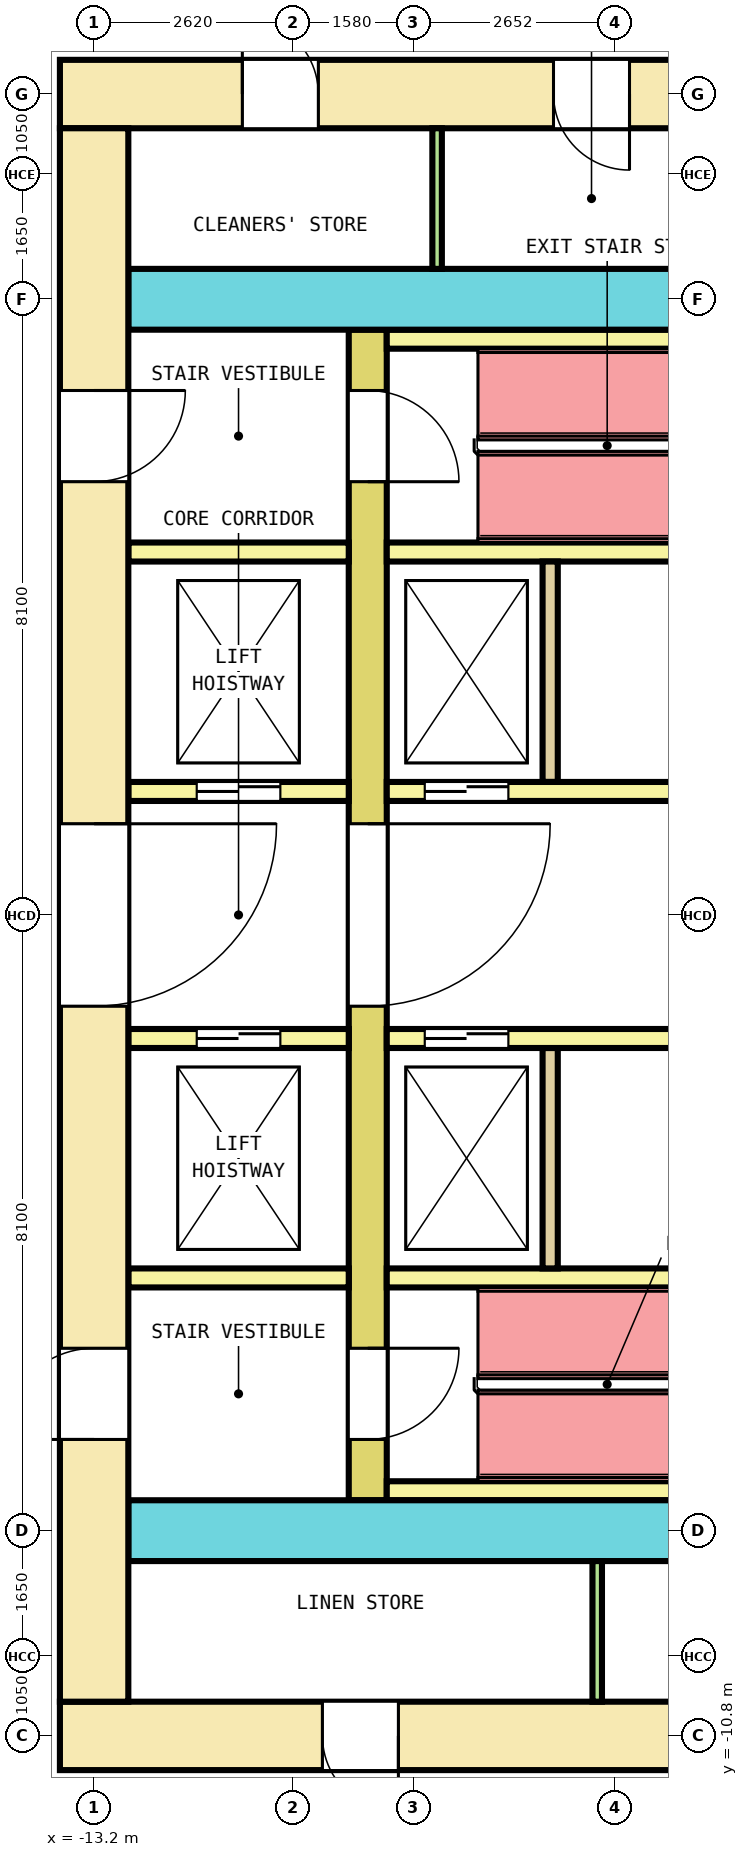
"""IFC4 building model, lengths in metres.
Left out: names, types, materials, properties, quantities, classifications, styles, units other than length and angle.
Written with IfcOpenShell. Run it as: python <this file> out.ifc"""

import sys

from ifc_helpers import new_model, si_unit, direction, frame, frame_2d, origin, place, context, subcontext, project, spatial, rectangle, extrude, element, fill, save


model = new_model("IFC4")
c1 = context("Model", 3, precision=1e-05, world=origin(), true_north=direction((0.0, 1.0)))
c2 = subcontext(c1, "Body", "Model", "MODEL_VIEW")
j1 = project(units=[si_unit("LENGTHUNIT", "METRE"), si_unit("PLANEANGLEUNIT", "RADIAN")], contexts=[c1])
p1 = place(None, origin())
s1 = spatial("IfcSite", under=j1, at=p1, CompositionType="ELEMENT")
p2 = place(p1, origin())
s2 = spatial("IfcBuilding", under=s1, at=p2, CompositionType="ELEMENT")
p3 = place(p2, frame((0.0, 0.0, 32.2)))
s3 = spatial("IfcBuildingStorey", under=s2, at=p3, CompositionType="ELEMENT", Elevation=32.2)
p4 = place(p3, frame((-13.65, 10.8, 0.0), z_axis=(0.0, 0.0, 1.0), x_axis=(1.0, 0.0, 0.0)))
e1 = element("IfcWall", 1, at=p4, inside=s3, PredefinedType="SHEAR", context=c2, shape_type="SweptSolid", body=[
    extrude(rectangle(XDim=27.3, YDim=0.9, at=frame_2d((13.65, 0.0))), origin(), (0.0, 0.0, 1.0), 4.1),
])
p5 = place(p4, frame((2.4, 0.0, 0.0)))
e2 = element("IfcOpeningElement", 2, at=p5, cuts=e1, PredefinedType="OPENING", context=c2, shape_type="SweptSolid", body=[
    extrude(rectangle(XDim=1.0, YDim=2.1, at=frame_2d((0.5, 1.05))), frame((0.0, 0.46, 0.0), z_axis=(0.0, -1.0, 0.0), x_axis=(1.0, 0.0, 0.0)), (0.0, 0.0, 1.0), 0.92),
])
p6 = place(p4, frame((6.494, 0.0, 0.0)))
e3 = element("IfcOpeningElement", 3, at=p6, cuts=e1, PredefinedType="OPENING", context=c2, shape_type="SweptSolid", body=[
    extrude(rectangle(XDim=1.0, YDim=2.1, at=frame_2d((0.5, 1.05))), frame((0.0, 0.46, 0.0), z_axis=(0.0, -1.0, 0.0), x_axis=(1.0, 0.0, 0.0)), (0.0, 0.0, 1.0), 0.92),
])
p7 = place(p4, frame((10.556, 0.0, 0.0)))
e4 = element("IfcOpeningElement", 4, at=p7, cuts=e1, PredefinedType="OPENING", context=c2, shape_type="SweptSolid", body=[
    extrude(rectangle(XDim=1.0, YDim=2.1, at=frame_2d((0.5, 1.05))), frame((0.0, 0.46, 0.0), z_axis=(0.0, -1.0, 0.0), x_axis=(1.0, 0.0, 0.0)), (0.0, 0.0, 1.0), 0.92),
])
p8 = place(p4, frame((18.859, 0.0, 0.0)))
e5 = element("IfcOpeningElement", 5, at=p8, cuts=e1, PredefinedType="OPENING", context=c2, shape_type="SweptSolid", body=[
    extrude(rectangle(XDim=1.0, YDim=2.1, at=frame_2d((0.5, 1.05))), frame((0.0, 0.46, 0.0), z_axis=(0.0, -1.0, 0.0), x_axis=(1.0, 0.0, 0.0)), (0.0, 0.0, 1.0), 0.92),
])
p9 = place(p4, frame((23.584, 0.0, 0.0)))
e6 = element("IfcOpeningElement", 6, at=p9, cuts=e1, PredefinedType="OPENING", context=c2, shape_type="SweptSolid", body=[
    extrude(rectangle(XDim=1.0, YDim=2.1, at=frame_2d((0.5, 1.05))), frame((0.0, 0.46, 0.0), z_axis=(0.0, -1.0, 0.0), x_axis=(1.0, 0.0, 0.0)), (0.0, 0.0, 1.0), 0.92),
])
p10 = place(p4, frame((14.575, 0.0, 0.0)))
e7 = element("IfcOpeningElement", 7, at=p10, cuts=e1, PredefinedType="OPENING", context=c2, shape_type="SweptSolid", body=[
    extrude(rectangle(XDim=1.4, YDim=2.1, at=frame_2d((0.7, 1.05))), frame((0.0, 0.46, 0.0), z_axis=(0.0, -1.0, 0.0), x_axis=(1.0, 0.0, 0.0)), (0.0, 0.0, 1.0), 0.92),
])
p11 = place(p3, frame((-13.65, -10.8, 0.0), z_axis=(0.0, 0.0, 1.0), x_axis=(1.0, 0.0, 0.0)))
e8 = element("IfcWall", 8, at=p11, inside=s3, PredefinedType="SHEAR", context=c2, shape_type="SweptSolid", body=[
    extrude(rectangle(XDim=27.3, YDim=0.9, at=frame_2d((13.65, 0.0))), origin(), (0.0, 0.0, 1.0), 4.1),
])
p12 = place(p11, frame((3.453, 0.0, 0.0)))
e9 = element("IfcOpeningElement", 9, at=p12, cuts=e8, PredefinedType="OPENING", context=c2, shape_type="SweptSolid", body=[
    extrude(rectangle(XDim=1.0, YDim=2.1, at=frame_2d((0.5, 1.05))), frame((0.0, 0.46, 0.0), z_axis=(0.0, -1.0, 0.0), x_axis=(1.0, 0.0, 0.0)), (0.0, 0.0, 1.0), 0.92),
])
p13 = place(p11, frame((9.653, 0.0, 0.0)))
e10 = element("IfcOpeningElement", 10, at=p13, cuts=e8, PredefinedType="OPENING", context=c2, shape_type="SweptSolid", body=[
    extrude(rectangle(XDim=1.0, YDim=2.1, at=frame_2d((0.5, 1.05))), frame((0.0, 0.46, 0.0), z_axis=(0.0, -1.0, 0.0), x_axis=(1.0, 0.0, 0.0)), (0.0, 0.0, 1.0), 0.92),
])
p14 = place(p11, frame((19.872, 0.0, 0.0)))
e11 = element("IfcOpeningElement", 11, at=p14, cuts=e8, PredefinedType="OPENING", context=c2, shape_type="SweptSolid", body=[
    extrude(rectangle(XDim=1.0, YDim=2.1, at=frame_2d((0.5, 1.05))), frame((0.0, 0.46, 0.0), z_axis=(0.0, -1.0, 0.0), x_axis=(1.0, 0.0, 0.0)), (0.0, 0.0, 1.0), 0.92),
])
p15 = place(p11, frame((23.922, 0.0, 0.0)))
e12 = element("IfcOpeningElement", 12, at=p15, cuts=e8, PredefinedType="OPENING", context=c2, shape_type="SweptSolid", body=[
    extrude(rectangle(XDim=1.0, YDim=2.1, at=frame_2d((0.5, 1.05))), frame((0.0, 0.46, 0.0), z_axis=(0.0, -1.0, 0.0), x_axis=(1.0, 0.0, 0.0)), (0.0, 0.0, 1.0), 0.92),
])
p16 = place(p11, frame((15.2, 0.0, 0.0)))
e13 = element("IfcOpeningElement", 13, at=p16, cuts=e8, PredefinedType="OPENING", context=c2, shape_type="SweptSolid", body=[
    extrude(rectangle(XDim=1.2, YDim=2.1, at=frame_2d((0.6, 1.05))), frame((0.0, 0.46, 0.0), z_axis=(0.0, -1.0, 0.0), x_axis=(1.0, 0.0, 0.0)), (0.0, 0.0, 1.0), 0.92),
])
p17 = place(p3, frame((-13.2, -10.35, 0.0), z_axis=(0.0, 0.0, 1.0), x_axis=(0.0, 1.0, 0.0)))
e14 = element("IfcWall", 14, at=p17, inside=s3, PredefinedType="SHEAR", context=c2, shape_type="SweptSolid", body=[
    extrude(rectangle(XDim=20.7, YDim=0.9, at=frame_2d((10.35, 0.0))), origin(), (0.0, 0.0, 1.0), 4.1),
])
p18 = place(p17, frame((9.15, 0.0, 0.0)))
e15 = element("IfcOpeningElement", 15, at=p18, cuts=e14, PredefinedType="OPENING", context=c2, shape_type="SweptSolid", body=[
    extrude(rectangle(XDim=2.4, YDim=2.1, at=frame_2d((1.2, 1.05))), frame((0.0, 0.46, 0.0), z_axis=(0.0, -1.0, 0.0), x_axis=(1.0, 0.0, 0.0)), (0.0, 0.0, 1.0), 0.92),
])
p19 = place(p17, frame((16.05, 0.0, 0.0)))
e16 = element("IfcOpeningElement", 16, at=p19, cuts=e14, PredefinedType="OPENING", context=c2, shape_type="SweptSolid", body=[
    extrude(rectangle(XDim=1.2, YDim=2.1, at=frame_2d((0.6, 1.05))), frame((0.0, 0.46, 0.0), z_axis=(0.0, -1.0, 0.0), x_axis=(1.0, 0.0, 0.0)), (0.0, 0.0, 1.0), 0.92),
])
p20 = place(p17, frame((3.45, 0.0, 0.0)))
e17 = element("IfcOpeningElement", 17, at=p20, cuts=e14, PredefinedType="OPENING", context=c2, shape_type="SweptSolid", body=[
    extrude(rectangle(XDim=1.2, YDim=2.1, at=frame_2d((0.6, 1.05))), frame((0.0, 0.46, 0.0), z_axis=(0.0, -1.0, 0.0), x_axis=(1.0, 0.0, 0.0)), (0.0, 0.0, 1.0), 0.92),
])
p21 = place(p3, frame((-12.75, 8.1, 0.0), z_axis=(0.0, 0.0, 1.0), x_axis=(1.0, 0.0, 0.0)))
e18 = element("IfcWall", 18, at=p21, inside=s3, PredefinedType="SHEAR", context=c2, shape_type="SweptSolid", body=[
    extrude(rectangle(XDim=25.5, YDim=0.8, at=frame_2d((12.75, 0.0))), origin(), (0.0, 0.0, 1.0), 4.1),
])
p22 = place(p21, frame((13.675, 0.0, 0.0)))
e19 = element("IfcOpeningElement", 19, at=p22, cuts=e18, PredefinedType="OPENING", context=c2, shape_type="SweptSolid", body=[
    extrude(rectangle(XDim=1.4, YDim=2.1, at=frame_2d((0.7, 1.05))), frame((0.0, 0.41, 0.0), z_axis=(0.0, -1.0, 0.0), x_axis=(1.0, 0.0, 0.0)), (0.0, 0.0, 1.0), 0.82),
])
p23 = place(p3, frame((-12.75, -8.1, 0.0), z_axis=(0.0, 0.0, 1.0), x_axis=(1.0, 0.0, 0.0)))
e20 = element("IfcWall", 20, at=p23, inside=s3, PredefinedType="SHEAR", context=c2, shape_type="SweptSolid", body=[
    extrude(rectangle(XDim=25.5, YDim=0.8, at=frame_2d((12.75, 0.0))), origin(), (0.0, 0.0, 1.0), 4.1),
])
p24 = place(p23, frame((14.3, 0.0, 0.0)))
e21 = element("IfcOpeningElement", 21, at=p24, cuts=e20, PredefinedType="OPENING", context=c2, shape_type="SweptSolid", body=[
    extrude(rectangle(XDim=1.2, YDim=2.1, at=frame_2d((0.6, 1.05))), frame((0.0, 0.41, 0.0), z_axis=(0.0, -1.0, 0.0), x_axis=(1.0, 0.0, 0.0)), (0.0, 0.0, 1.0), 0.82),
])
p25 = place(p3, frame((-9.6, -7.7, 0.0), z_axis=(0.0, 0.0, 1.0), x_axis=(0.0, 1.0, 0.0)))
e22 = element("IfcWall", 22, at=p25, inside=s3, PredefinedType="SHEAR", context=c2, shape_type="SweptSolid", body=[
    extrude(rectangle(XDim=15.4, YDim=0.5, at=frame_2d((7.7, 0.0))), origin(), (0.0, 0.0, 1.0), 4.1),
])
p26 = place(p25, frame((6.5, 0.0, 0.0)))
e23 = element("IfcOpeningElement", 23, at=p26, cuts=e22, PredefinedType="OPENING", context=c2, shape_type="SweptSolid", body=[
    extrude(rectangle(XDim=2.4, YDim=2.1, at=frame_2d((1.2, 1.05))), frame((0.0, 0.26, 0.0), z_axis=(0.0, -1.0, 0.0), x_axis=(1.0, 0.0, 0.0)), (0.0, 0.0, 1.0), 0.52),
])
p27 = place(p25, frame((13.4, 0.0, 0.0)))
e24 = element("IfcOpeningElement", 24, at=p27, cuts=e22, PredefinedType="OPENING", context=c2, shape_type="SweptSolid", body=[
    extrude(rectangle(XDim=1.2, YDim=2.1, at=frame_2d((0.6, 1.05))), frame((0.0, 0.26, 0.0), z_axis=(0.0, -1.0, 0.0), x_axis=(1.0, 0.0, 0.0)), (0.0, 0.0, 1.0), 0.52),
])
p28 = place(p25, frame((0.8, 0.0, 0.0)))
e25 = element("IfcOpeningElement", 25, at=p28, cuts=e22, PredefinedType="OPENING", context=c2, shape_type="SweptSolid", body=[
    extrude(rectangle(XDim=1.2, YDim=2.1, at=frame_2d((0.6, 1.05))), frame((0.0, 0.26, 0.0), z_axis=(0.0, -1.0, 0.0), x_axis=(1.0, 0.0, 0.0)), (0.0, 0.0, 1.0), 0.52),
])
p29 = place(p3, frame((-12.75, 1.625, 0.0), z_axis=(0.0, 0.0, 1.0), x_axis=(1.0, 0.0, 0.0)))
e26 = element("IfcWall", 26, at=p29, inside=s3, PredefinedType="SOLIDWALL", context=c2, shape_type="SweptSolid", body=[
    extrude(rectangle(XDim=2.9, YDim=0.25, at=frame_2d((1.45, 0.0))), origin(), (0.0, 0.0, 1.0), 4.1),
])
p30 = place(p29, frame((0.9, 0.0, 0.0)))
e27 = element("IfcOpeningElement", 27, at=p30, cuts=e26, PredefinedType="OPENING", context=c2, shape_type="SweptSolid", body=[
    extrude(rectangle(XDim=1.1, YDim=2.1, at=frame_2d((0.55, 1.05))), frame((0.0, 0.135, 0.0), z_axis=(0.0, -1.0, 0.0), x_axis=(1.0, 0.0, 0.0)), (0.0, 0.0, 1.0), 0.27),
])
p31 = place(p3, frame((-9.35, 1.625, 0.0), z_axis=(0.0, 0.0, 1.0), x_axis=(1.0, 0.0, 0.0)))
e28 = element("IfcWall", 28, at=p31, inside=s3, PredefinedType="SOLIDWALL", context=c2, shape_type="SweptSolid", body=[
    extrude(rectangle(XDim=18.7, YDim=0.25, at=frame_2d((9.35, 0.0))), origin(), (0.0, 0.0, 1.0), 4.1),
])
p32 = place(p31, frame((0.5, 0.0, 0.0)))
e29 = element("IfcOpeningElement", 29, at=p32, cuts=e28, PredefinedType="OPENING", context=c2, shape_type="SweptSolid", body=[
    extrude(rectangle(XDim=1.1, YDim=2.1, at=frame_2d((0.55, 1.05))), frame((0.0, 0.135, 0.0), z_axis=(0.0, -1.0, 0.0), x_axis=(1.0, 0.0, 0.0)), (0.0, 0.0, 1.0), 0.27),
])
p33 = place(p31, frame((17.1, 0.0, 0.0)))
e30 = element("IfcOpeningElement", 30, at=p33, cuts=e28, PredefinedType="OPENING", context=c2, shape_type="SweptSolid", body=[
    extrude(rectangle(XDim=1.1, YDim=2.1, at=frame_2d((0.55, 1.05))), frame((0.0, 0.135, 0.0), z_axis=(0.0, -1.0, 0.0), x_axis=(1.0, 0.0, 0.0)), (0.0, 0.0, 1.0), 0.27),
])
p34 = place(p3, frame((-12.75, 4.775, 0.0), z_axis=(0.0, 0.0, 1.0), x_axis=(1.0, 0.0, 0.0)))
e31 = element("IfcWall", 31, at=p34, inside=s3, PredefinedType="SOLIDWALL", context=c2, shape_type="SweptSolid", body=[
    extrude(rectangle(XDim=2.9, YDim=0.25, at=frame_2d((1.45, 0.0))), origin(), (0.0, 0.0, 1.0), 4.1),
])
p35 = place(p3, frame((-9.35, 4.775, 0.0), z_axis=(0.0, 0.0, 1.0), x_axis=(1.0, 0.0, 0.0)))
e32 = element("IfcWall", 32, at=p35, inside=s3, PredefinedType="SOLIDWALL", context=c2, shape_type="SweptSolid", body=[
    extrude(rectangle(XDim=18.7, YDim=0.25, at=frame_2d((9.35, 0.0))), origin(), (0.0, 0.0, 1.0), 4.1),
])
p36 = place(p3, frame((-7.2, 1.75, 0.0), z_axis=(0.0, 0.0, 1.0), x_axis=(0.0, 1.0, 0.0)))
e33 = element("IfcWall", 33, at=p36, inside=s3, PredefinedType="SOLIDWALL", context=c2, shape_type="SweptSolid", body=[
    extrude(rectangle(XDim=2.9, YDim=0.2, at=frame_2d((1.45, 0.0))), origin(), (0.0, 0.0, 1.0), 4.1),
])
p37 = place(p3, frame((-12.75, -1.625, 0.0), z_axis=(0.0, 0.0, 1.0), x_axis=(1.0, 0.0, 0.0)))
e34 = element("IfcWall", 34, at=p37, inside=s3, PredefinedType="SOLIDWALL", context=c2, shape_type="SweptSolid", body=[
    extrude(rectangle(XDim=2.9, YDim=0.25, at=frame_2d((1.45, 0.0))), origin(), (0.0, 0.0, 1.0), 4.1),
])
p38 = place(p37, frame((0.9, 0.0, 0.0)))
e35 = element("IfcOpeningElement", 35, at=p38, cuts=e34, PredefinedType="OPENING", context=c2, shape_type="SweptSolid", body=[
    extrude(rectangle(XDim=1.1, YDim=2.1, at=frame_2d((0.55, 1.05))), frame((0.0, 0.135, 0.0), z_axis=(0.0, -1.0, 0.0), x_axis=(1.0, 0.0, 0.0)), (0.0, 0.0, 1.0), 0.27),
])
p39 = place(p3, frame((-9.35, -1.625, 0.0), z_axis=(0.0, 0.0, 1.0), x_axis=(1.0, 0.0, 0.0)))
e36 = element("IfcWall", 36, at=p39, inside=s3, PredefinedType="SOLIDWALL", context=c2, shape_type="SweptSolid", body=[
    extrude(rectangle(XDim=18.7, YDim=0.25, at=frame_2d((9.35, 0.0))), origin(), (0.0, 0.0, 1.0), 4.1),
])
p40 = place(p39, frame((0.5, 0.0, 0.0)))
e37 = element("IfcOpeningElement", 37, at=p40, cuts=e36, PredefinedType="OPENING", context=c2, shape_type="SweptSolid", body=[
    extrude(rectangle(XDim=1.1, YDim=2.1, at=frame_2d((0.55, 1.05))), frame((0.0, 0.135, 0.0), z_axis=(0.0, -1.0, 0.0), x_axis=(1.0, 0.0, 0.0)), (0.0, 0.0, 1.0), 0.27),
])
p41 = place(p39, frame((17.1, 0.0, 0.0)))
e38 = element("IfcOpeningElement", 38, at=p41, cuts=e36, PredefinedType="OPENING", context=c2, shape_type="SweptSolid", body=[
    extrude(rectangle(XDim=1.1, YDim=2.1, at=frame_2d((0.55, 1.05))), frame((0.0, 0.135, 0.0), z_axis=(0.0, -1.0, 0.0), x_axis=(1.0, 0.0, 0.0)), (0.0, 0.0, 1.0), 0.27),
])
p42 = place(p3, frame((-12.75, -4.775, 0.0), z_axis=(0.0, 0.0, 1.0), x_axis=(1.0, 0.0, 0.0)))
e39 = element("IfcWall", 39, at=p42, inside=s3, PredefinedType="SOLIDWALL", context=c2, shape_type="SweptSolid", body=[
    extrude(rectangle(XDim=2.9, YDim=0.25, at=frame_2d((1.45, 0.0))), origin(), (0.0, 0.0, 1.0), 4.1),
])
p43 = place(p3, frame((-9.35, -4.775, 0.0), z_axis=(0.0, 0.0, 1.0), x_axis=(1.0, 0.0, 0.0)))
e40 = element("IfcWall", 40, at=p43, inside=s3, PredefinedType="SOLIDWALL", context=c2, shape_type="SweptSolid", body=[
    extrude(rectangle(XDim=18.7, YDim=0.25, at=frame_2d((9.35, 0.0))), origin(), (0.0, 0.0, 1.0), 4.1),
])
p44 = place(p3, frame((-7.2, -4.65, 0.0), z_axis=(0.0, 0.0, 1.0), x_axis=(0.0, 1.0, 0.0)))
e41 = element("IfcWall", 41, at=p44, inside=s3, PredefinedType="SOLIDWALL", context=c2, shape_type="SweptSolid", body=[
    extrude(rectangle(XDim=2.9, YDim=0.2, at=frame_2d((1.45, 0.0))), origin(), (0.0, 0.0, 1.0), 4.1),
])
for number, where, z_axis, x_axis in (
    (42, (-9.35, 7.575, 0.0), (0.0, 0.0, 1.0), (1.0, 0.0, 0.0)),
    (43, (-9.35, -7.575, 0.0), (0.0, 0.0, 1.0), (1.0, 0.0, 0.0)),
):
    element("IfcWall", number, at=place(p3, frame(where, z_axis=z_axis, x_axis=x_axis)), inside=s3, PredefinedType="SOLIDWALL", context=c2, shape_type="SweptSolid", body=[
        extrude(rectangle(XDim=5.8, YDim=0.25, at=frame_2d((2.9, 0.0))), origin(), (0.0, 0.0, 1.0), 4.1),
    ])
for number, where, z_axis, x_axis in (
    (44, (-8.688, 8.5, 0.0), (0.0, 0.0, 1.0), (0.0, 1.0, 0.0)),
    (45, (-6.581, -10.35, 0.0), (0.0, 0.0, 1.0), (0.0, 1.0, 0.0)),
):
    element("IfcWall", number, at=place(p3, frame(where, z_axis=z_axis, x_axis=x_axis)), inside=s3, PredefinedType="PARTITIONING", context=c2, shape_type="SweptSolid", body=[
        extrude(rectangle(XDim=1.85, YDim=0.125, at=frame_2d((0.925, 0.0))), origin(), (0.0, 0.0, 1.0), 4.1),
    ])
p45 = place(p30, origin())
e46 = element("IfcDoor", 46, at=p45, inside=s3, OperationType="DOUBLE_DOOR_SLIDING", PredefinedType="DOOR", context=c2, shape_type="SweptSolid", body=[
    extrude(rectangle(XDim=1.1, YDim=2.1, at=frame_2d((0.55, 1.05))), frame((0.0, 0.075, 0.0), z_axis=(0.0, -1.0, 0.0), x_axis=(1.0, 0.0, 0.0)), (0.0, 0.0, 1.0), 0.15),
])
fill(e27, e46)
p46 = place(p32, origin())
e47 = element("IfcDoor", 47, at=p46, inside=s3, OperationType="DOUBLE_DOOR_SLIDING", PredefinedType="DOOR", context=c2, shape_type="SweptSolid", body=[
    extrude(rectangle(XDim=1.1, YDim=2.1, at=frame_2d((0.55, 1.05))), frame((0.0, 0.075, 0.0), z_axis=(0.0, -1.0, 0.0), x_axis=(1.0, 0.0, 0.0)), (0.0, 0.0, 1.0), 0.15),
])
fill(e29, e47)
p47 = place(p38, origin())
e48 = element("IfcDoor", 48, at=p47, inside=s3, OperationType="DOUBLE_DOOR_SLIDING", PredefinedType="DOOR", context=c2, shape_type="SweptSolid", body=[
    extrude(rectangle(XDim=1.1, YDim=2.1, at=frame_2d((0.55, 1.05))), frame((0.0, 0.075, 0.0), z_axis=(0.0, -1.0, 0.0), x_axis=(1.0, 0.0, 0.0)), (0.0, 0.0, 1.0), 0.15),
])
fill(e35, e48)
p48 = place(p40, origin())
e49 = element("IfcDoor", 49, at=p48, inside=s3, OperationType="DOUBLE_DOOR_SLIDING", PredefinedType="DOOR", context=c2, shape_type="SweptSolid", body=[
    extrude(rectangle(XDim=1.1, YDim=2.1, at=frame_2d((0.55, 1.05))), frame((0.0, 0.075, 0.0), z_axis=(0.0, -1.0, 0.0), x_axis=(1.0, 0.0, 0.0)), (0.0, 0.0, 1.0), 0.15),
])
fill(e37, e49)
p49 = place(p26, origin())
e50 = element("IfcDoor", 50, at=p49, inside=s3, OperationType="DOUBLE_DOOR_SINGLE_SWING", PredefinedType="DOOR", context=c2, shape_type="SweptSolid", body=[
    extrude(rectangle(XDim=2.4, YDim=2.1, at=frame_2d((1.2, 1.05))), frame((0.0, 0.2, 0.0), z_axis=(0.0, -1.0, 0.0), x_axis=(1.0, 0.0, 0.0)), (0.0, 0.0, 1.0), 0.4),
])
fill(e23, e50)
p50 = place(p18, origin())
e51 = element("IfcDoor", 51, at=p50, inside=s3, OperationType="DOUBLE_DOOR_SINGLE_SWING", PredefinedType="DOOR", context=c2, shape_type="SweptSolid", body=[
    extrude(rectangle(XDim=2.4, YDim=2.1, at=frame_2d((1.2, 1.05))), frame((0.0, 0.3, 0.0), z_axis=(0.0, -1.0, 0.0), x_axis=(1.0, 0.0, 0.0)), (0.0, 0.0, 1.0), 0.6),
])
fill(e15, e51)
p51 = place(p27, origin())
e52 = element("IfcDoor", 52, at=p51, inside=s3, OperationType="SINGLE_SWING_RIGHT", PredefinedType="DOOR", context=c2, shape_type="SweptSolid", body=[
    extrude(rectangle(XDim=1.2, YDim=2.1, at=frame_2d((0.6, 1.05))), frame((0.0, 0.2, 0.0), z_axis=(0.0, -1.0, 0.0), x_axis=(1.0, 0.0, 0.0)), (0.0, 0.0, 1.0), 0.4),
])
fill(e24, e52)
p52 = place(p19, origin())
e53 = element("IfcDoor", 53, at=p52, inside=s3, OperationType="SINGLE_SWING_LEFT", PredefinedType="DOOR", context=c2, shape_type="SweptSolid", body=[
    extrude(rectangle(XDim=1.2, YDim=2.1, at=frame_2d((0.6, 1.05))), frame((0.0, 0.3, 0.0), z_axis=(0.0, -1.0, 0.0), x_axis=(1.0, 0.0, 0.0)), (0.0, 0.0, 1.0), 0.6),
])
fill(e16, e53)
p53 = place(p28, origin())
e54 = element("IfcDoor", 54, at=p53, inside=s3, OperationType="SINGLE_SWING_RIGHT", PredefinedType="DOOR", context=c2, shape_type="SweptSolid", body=[
    extrude(rectangle(XDim=1.2, YDim=2.1, at=frame_2d((0.6, 1.05))), frame((0.0, 0.2, 0.0), z_axis=(0.0, -1.0, 0.0), x_axis=(1.0, 0.0, 0.0)), (0.0, 0.0, 1.0), 0.4),
])
fill(e25, e54)
p54 = place(p20, origin())
e55 = element("IfcDoor", 55, at=p54, inside=s3, OperationType="SINGLE_SWING_LEFT", PredefinedType="DOOR", context=c2, shape_type="SweptSolid", body=[
    extrude(rectangle(XDim=1.2, YDim=2.1, at=frame_2d((0.6, 1.05))), frame((0.0, 0.3, 0.0), z_axis=(0.0, -1.0, 0.0), x_axis=(1.0, 0.0, 0.0)), (0.0, 0.0, 1.0), 0.6),
])
fill(e17, e55)
p55 = place(p5, origin())
e56 = element("IfcDoor", 56, at=p55, inside=s3, OperationType="SINGLE_SWING_LEFT", PredefinedType="DOOR", context=c2, shape_type="SweptSolid", body=[
    extrude(rectangle(XDim=1.0, YDim=2.1, at=frame_2d((0.5, 1.05))), frame((0.0, 0.3, 0.0), z_axis=(0.0, -1.0, 0.0), x_axis=(1.0, 0.0, 0.0)), (0.0, 0.0, 1.0), 0.6),
])
fill(e2, e56)
p56 = place(p6, origin())
e57 = element("IfcDoor", 57, at=p56, inside=s3, OperationType="SINGLE_SWING_RIGHT", PredefinedType="DOOR", context=c2, shape_type="SweptSolid", body=[
    extrude(rectangle(XDim=1.0, YDim=2.1, at=frame_2d((0.5, 1.05))), frame((0.0, 0.3, 0.0), z_axis=(0.0, -1.0, 0.0), x_axis=(1.0, 0.0, 0.0)), (0.0, 0.0, 1.0), 0.6),
])
fill(e3, e57)
p57 = place(p12, origin())
e58 = element("IfcDoor", 58, at=p57, inside=s3, OperationType="SINGLE_SWING_LEFT", PredefinedType="DOOR", context=c2, shape_type="SweptSolid", body=[
    extrude(rectangle(XDim=1.0, YDim=2.1, at=frame_2d((0.5, 1.05))), frame((0.0, 0.3, 0.0), z_axis=(0.0, -1.0, 0.0), x_axis=(1.0, 0.0, 0.0)), (0.0, 0.0, 1.0), 0.6),
])
fill(e9, e58)
save(model, sys.argv[1])
